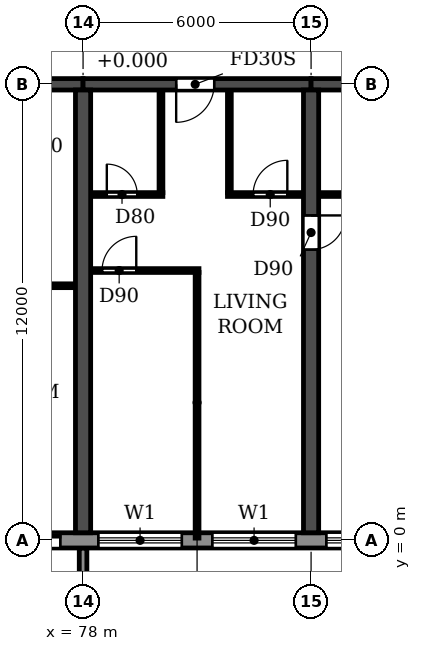
"""IFC4 building model, lengths in metres.
Left out: names, types, materials, properties, quantities, classifications, styles, units other than length and angle.
Written with IfcOpenShell. Run it as: python <this file> out.ifc"""

import sys

from ifc_helpers import new_model, si_unit, direction, frame, frame_2d, origin, place, context, subcontext, project, spatial, polyline, rectangle, outline, extrude, source, transform, mapped, element, fill, save


model = new_model("IFC4")
c1 = context("Model", 3, precision=1e-05, world=origin(), true_north=direction((0.0, 1.0)))
c2 = subcontext(c1, "Body", "Model", "MODEL_VIEW")
j1 = project(units=[si_unit("LENGTHUNIT", "METRE"), si_unit("PLANEANGLEUNIT", "RADIAN")], contexts=[c1])
p1 = place(None, origin())
s1 = spatial("IfcSite", under=j1, at=p1, CompositionType="ELEMENT")
p2 = place(p1, origin())
s2 = spatial("IfcBuilding", under=s1, at=p2, CompositionType="ELEMENT")
p3 = place(p2, frame((0.0, 0.0, 26.7)))
s3 = spatial("IfcBuildingStorey", under=s2, at=p3, CompositionType="ELEMENT", Elevation=26.7)
p4 = place(p3, frame((78.0, 0.2, 0.0), z_axis=(0.0, 0.0, 1.0), x_axis=(0.0, 1.0, 0.0)))
e1 = element("IfcWall", 1, at=p4, inside=s3, PredefinedType="SHEAR", context=c2, shape_type="SweptSolid", body=[
    extrude(rectangle(XDim=11.65, YDim=0.4, at=frame_2d((5.825, 0.0))), origin(), (0.0, 0.0, 1.0), 3.05),
])
p5 = place(p3, frame((84.0, 0.2, 0.0), z_axis=(0.0, 0.0, 1.0), x_axis=(0.0, 1.0, 0.0)))
e2 = element("IfcWall", 2, at=p5, inside=s3, PredefinedType="SHEAR", context=c2, shape_type="SweptSolid", body=[
    extrude(rectangle(XDim=11.65, YDim=0.4, at=frame_2d((5.825, 0.0))), origin(), (0.0, 0.0, 1.0), 3.05),
])
p6 = place(p5, frame((7.45, 0.0, 0.0)))
e3 = element("IfcOpeningElement", 3, at=p6, cuts=e2, PredefinedType="OPENING", context=c2, shape_type="SweptSolid", body=[
    extrude(rectangle(XDim=0.9, YDim=2.1, at=frame_2d((0.45, 1.05))), frame((0.0, 0.21, 0.0), z_axis=(0.0, -1.0, 0.0), x_axis=(1.0, 0.0, 0.0)), (0.0, 0.0, 1.0), 0.42),
])
p7 = place(p3, frame((72.0, 12.0, 0.0), z_axis=(0.0, 0.0, 1.0), x_axis=(1.0, 0.0, 0.0)))
e4 = element("IfcWall", 4, at=p7, inside=s3, PredefinedType="SHEAR", context=c2, shape_type="SweptSolid", body=[
    extrude(rectangle(XDim=6.0, YDim=0.3, at=frame_2d((3.0, 0.0))), origin(), (0.0, 0.0, 1.0), 2.45),
])
p8 = place(p7, frame((2.55, 0.0, 0.0)))
e5 = element("IfcOpeningElement", 5, at=p8, cuts=e4, PredefinedType="OPENING", context=c2, shape_type="SweptSolid", body=[
    extrude(rectangle(XDim=1.0, YDim=2.1, at=frame_2d((0.5, 1.05))), frame((0.0, 0.16, 0.0), z_axis=(0.0, -1.0, 0.0), x_axis=(1.0, 0.0, 0.0)), (0.0, 0.0, 1.0), 0.32),
])
p9 = place(p3, frame((78.0, 12.0, 0.0), z_axis=(0.0, 0.0, 1.0), x_axis=(1.0, 0.0, 0.0)))
e6 = element("IfcWall", 6, at=p9, inside=s3, PredefinedType="SHEAR", context=c2, shape_type="SweptSolid", body=[
    extrude(rectangle(XDim=6.0, YDim=0.3, at=frame_2d((3.0, 0.0))), origin(), (0.0, 0.0, 1.0), 2.45),
])
p10 = place(p9, frame((2.45, 0.0, 0.0)))
e7 = element("IfcOpeningElement", 7, at=p10, cuts=e6, PredefinedType="OPENING", context=c2, shape_type="SweptSolid", body=[
    extrude(rectangle(XDim=1.0, YDim=2.1, at=frame_2d((0.5, 1.05))), frame((0.0, 0.16, 0.0), z_axis=(0.0, -1.0, 0.0), x_axis=(1.0, 0.0, 0.0)), (0.0, 0.0, 1.0), 0.32),
])
p11 = place(p3, frame((84.0, 12.0, 0.0), z_axis=(0.0, 0.0, 1.0), x_axis=(1.0, 0.0, 0.0)))
e8 = element("IfcWall", 8, at=p11, inside=s3, PredefinedType="SHEAR", context=c2, shape_type="SweptSolid", body=[
    extrude(rectangle(XDim=6.0, YDim=0.3, at=frame_2d((3.0, 0.0))), origin(), (0.0, 0.0, 1.0), 2.45),
])
p12 = place(p3, frame((4.683, 0.0, 0.0), z_axis=(0.0, 0.0, 1.0), x_axis=(1.0, 0.0, 0.0)))
e9 = element("IfcWall", 9, at=p12, inside=s3, PredefinedType="STANDARD", context=c2, shape_type="SweptSolid", body=[
    extrude(rectangle(XDim=92.634, YDim=0.4, at=frame_2d((46.317, 0.0))), origin(), (0.0, 0.0, 1.0), 3.05),
])
p13 = place(p12, frame((1.717, 0.0, 0.9)))
e10 = element("IfcOpeningElement", 10, at=p13, cuts=e9, PredefinedType="OPENING", context=c2, shape_type="SweptSolid", body=[
    extrude(rectangle(XDim=2.2, YDim=1.5, at=frame_2d((1.1, 0.75))), frame((0.0, 0.21, 0.0), z_axis=(0.0, -1.0, 0.0), x_axis=(1.0, 0.0, 0.0)), (0.0, 0.0, 1.0), 0.42),
])
p14 = place(p12, frame((4.717, 0.0, 0.9)))
e11 = element("IfcOpeningElement", 11, at=p14, cuts=e9, PredefinedType="OPENING", context=c2, shape_type="SweptSolid", body=[
    extrude(rectangle(XDim=2.2, YDim=1.5, at=frame_2d((1.1, 0.75))), frame((0.0, 0.21, 0.0), z_axis=(0.0, -1.0, 0.0), x_axis=(1.0, 0.0, 0.0)), (0.0, 0.0, 1.0), 0.42),
])
p15 = place(p12, frame((7.717, 0.0, 0.9)))
e12 = element("IfcOpeningElement", 12, at=p15, cuts=e9, PredefinedType="OPENING", context=c2, shape_type="SweptSolid", body=[
    extrude(rectangle(XDim=2.2, YDim=1.5, at=frame_2d((1.1, 0.75))), frame((0.0, 0.21, 0.0), z_axis=(0.0, -1.0, 0.0), x_axis=(1.0, 0.0, 0.0)), (0.0, 0.0, 1.0), 0.42),
])
p16 = place(p12, frame((10.717, 0.0, 0.9)))
e13 = element("IfcOpeningElement", 13, at=p16, cuts=e9, PredefinedType="OPENING", context=c2, shape_type="SweptSolid", body=[
    extrude(rectangle(XDim=2.2, YDim=1.5, at=frame_2d((1.1, 0.75))), frame((0.0, 0.21, 0.0), z_axis=(0.0, -1.0, 0.0), x_axis=(1.0, 0.0, 0.0)), (0.0, 0.0, 1.0), 0.42),
])
p17 = place(p12, frame((13.717, 0.0, 0.9)))
e14 = element("IfcOpeningElement", 14, at=p17, cuts=e9, PredefinedType="OPENING", context=c2, shape_type="SweptSolid", body=[
    extrude(rectangle(XDim=2.2, YDim=1.5, at=frame_2d((1.1, 0.75))), frame((0.0, 0.21, 0.0), z_axis=(0.0, -1.0, 0.0), x_axis=(1.0, 0.0, 0.0)), (0.0, 0.0, 1.0), 0.42),
])
p18 = place(p12, frame((16.717, 0.0, 0.9)))
e15 = element("IfcOpeningElement", 15, at=p18, cuts=e9, PredefinedType="OPENING", context=c2, shape_type="SweptSolid", body=[
    extrude(rectangle(XDim=2.2, YDim=1.5, at=frame_2d((1.1, 0.75))), frame((0.0, 0.21, 0.0), z_axis=(0.0, -1.0, 0.0), x_axis=(1.0, 0.0, 0.0)), (0.0, 0.0, 1.0), 0.42),
])
p19 = place(p12, frame((19.917, 0.0, 0.0)))
e16 = element("IfcOpeningElement", 16, at=p19, cuts=e9, PredefinedType="OPENING", context=c2, shape_type="SweptSolid", body=[
    extrude(rectangle(XDim=1.8, YDim=2.4, at=frame_2d((0.9, 1.2))), frame((0.0, 0.21, 0.0), z_axis=(0.0, -1.0, 0.0), x_axis=(1.0, 0.0, 0.0)), (0.0, 0.0, 1.0), 0.42),
])
p20 = place(p12, frame((22.717, 0.0, 0.9)))
e17 = element("IfcOpeningElement", 17, at=p20, cuts=e9, PredefinedType="OPENING", context=c2, shape_type="SweptSolid", body=[
    extrude(rectangle(XDim=2.2, YDim=1.5, at=frame_2d((1.1, 0.75))), frame((0.0, 0.21, 0.0), z_axis=(0.0, -1.0, 0.0), x_axis=(1.0, 0.0, 0.0)), (0.0, 0.0, 1.0), 0.42),
])
p21 = place(p12, frame((25.717, 0.0, 0.9)))
e18 = element("IfcOpeningElement", 18, at=p21, cuts=e9, PredefinedType="OPENING", context=c2, shape_type="SweptSolid", body=[
    extrude(rectangle(XDim=2.2, YDim=1.5, at=frame_2d((1.1, 0.75))), frame((0.0, 0.21, 0.0), z_axis=(0.0, -1.0, 0.0), x_axis=(1.0, 0.0, 0.0)), (0.0, 0.0, 1.0), 0.42),
])
p22 = place(p12, frame((28.717, 0.0, 0.9)))
e19 = element("IfcOpeningElement", 19, at=p22, cuts=e9, PredefinedType="OPENING", context=c2, shape_type="SweptSolid", body=[
    extrude(rectangle(XDim=2.2, YDim=1.5, at=frame_2d((1.1, 0.75))), frame((0.0, 0.21, 0.0), z_axis=(0.0, -1.0, 0.0), x_axis=(1.0, 0.0, 0.0)), (0.0, 0.0, 1.0), 0.42),
])
p23 = place(p12, frame((31.917, 0.0, 0.0)))
e20 = element("IfcOpeningElement", 20, at=p23, cuts=e9, PredefinedType="OPENING", context=c2, shape_type="SweptSolid", body=[
    extrude(rectangle(XDim=1.8, YDim=2.4, at=frame_2d((0.9, 1.2))), frame((0.0, 0.21, 0.0), z_axis=(0.0, -1.0, 0.0), x_axis=(1.0, 0.0, 0.0)), (0.0, 0.0, 1.0), 0.42),
])
p24 = place(p12, frame((34.717, 0.0, 0.9)))
e21 = element("IfcOpeningElement", 21, at=p24, cuts=e9, PredefinedType="OPENING", context=c2, shape_type="SweptSolid", body=[
    extrude(rectangle(XDim=2.2, YDim=1.5, at=frame_2d((1.1, 0.75))), frame((0.0, 0.21, 0.0), z_axis=(0.0, -1.0, 0.0), x_axis=(1.0, 0.0, 0.0)), (0.0, 0.0, 1.0), 0.42),
])
p25 = place(p12, frame((37.717, 0.0, 0.9)))
e22 = element("IfcOpeningElement", 22, at=p25, cuts=e9, PredefinedType="OPENING", context=c2, shape_type="SweptSolid", body=[
    extrude(rectangle(XDim=2.2, YDim=1.5, at=frame_2d((1.1, 0.75))), frame((0.0, 0.21, 0.0), z_axis=(0.0, -1.0, 0.0), x_axis=(1.0, 0.0, 0.0)), (0.0, 0.0, 1.0), 0.42),
])
p26 = place(p12, frame((40.717, 0.0, 0.9)))
e23 = element("IfcOpeningElement", 23, at=p26, cuts=e9, PredefinedType="OPENING", context=c2, shape_type="SweptSolid", body=[
    extrude(rectangle(XDim=2.2, YDim=1.5, at=frame_2d((1.1, 0.75))), frame((0.0, 0.21, 0.0), z_axis=(0.0, -1.0, 0.0), x_axis=(1.0, 0.0, 0.0)), (0.0, 0.0, 1.0), 0.42),
])
p27 = place(p12, frame((43.917, 0.0, 0.0)))
e24 = element("IfcOpeningElement", 24, at=p27, cuts=e9, PredefinedType="OPENING", context=c2, shape_type="SweptSolid", body=[
    extrude(rectangle(XDim=1.8, YDim=2.4, at=frame_2d((0.9, 1.2))), frame((0.0, 0.21, 0.0), z_axis=(0.0, -1.0, 0.0), x_axis=(1.0, 0.0, 0.0)), (0.0, 0.0, 1.0), 0.42),
])
p28 = place(p12, frame((46.717, 0.0, 0.9)))
e25 = element("IfcOpeningElement", 25, at=p28, cuts=e9, PredefinedType="OPENING", context=c2, shape_type="SweptSolid", body=[
    extrude(rectangle(XDim=2.2, YDim=1.5, at=frame_2d((1.1, 0.75))), frame((0.0, 0.21, 0.0), z_axis=(0.0, -1.0, 0.0), x_axis=(1.0, 0.0, 0.0)), (0.0, 0.0, 1.0), 0.42),
])
p29 = place(p12, frame((49.717, 0.0, 0.9)))
e26 = element("IfcOpeningElement", 26, at=p29, cuts=e9, PredefinedType="OPENING", context=c2, shape_type="SweptSolid", body=[
    extrude(rectangle(XDim=2.2, YDim=1.5, at=frame_2d((1.1, 0.75))), frame((0.0, 0.21, 0.0), z_axis=(0.0, -1.0, 0.0), x_axis=(1.0, 0.0, 0.0)), (0.0, 0.0, 1.0), 0.42),
])
p30 = place(p12, frame((52.717, 0.0, 0.9)))
e27 = element("IfcOpeningElement", 27, at=p30, cuts=e9, PredefinedType="OPENING", context=c2, shape_type="SweptSolid", body=[
    extrude(rectangle(XDim=2.2, YDim=1.5, at=frame_2d((1.1, 0.75))), frame((0.0, 0.21, 0.0), z_axis=(0.0, -1.0, 0.0), x_axis=(1.0, 0.0, 0.0)), (0.0, 0.0, 1.0), 0.42),
])
p31 = place(p12, frame((55.717, 0.0, 0.9)))
e28 = element("IfcOpeningElement", 28, at=p31, cuts=e9, PredefinedType="OPENING", context=c2, shape_type="SweptSolid", body=[
    extrude(rectangle(XDim=2.2, YDim=1.5, at=frame_2d((1.1, 0.75))), frame((0.0, 0.21, 0.0), z_axis=(0.0, -1.0, 0.0), x_axis=(1.0, 0.0, 0.0)), (0.0, 0.0, 1.0), 0.42),
])
p32 = place(p12, frame((58.917, 0.0, 0.0)))
e29 = element("IfcOpeningElement", 29, at=p32, cuts=e9, PredefinedType="OPENING", context=c2, shape_type="SweptSolid", body=[
    extrude(rectangle(XDim=1.8, YDim=2.4, at=frame_2d((0.9, 1.2))), frame((0.0, 0.21, 0.0), z_axis=(0.0, -1.0, 0.0), x_axis=(1.0, 0.0, 0.0)), (0.0, 0.0, 1.0), 0.42),
])
p33 = place(p12, frame((61.717, 0.0, 0.9)))
e30 = element("IfcOpeningElement", 30, at=p33, cuts=e9, PredefinedType="OPENING", context=c2, shape_type="SweptSolid", body=[
    extrude(rectangle(XDim=2.2, YDim=1.5, at=frame_2d((1.1, 0.75))), frame((0.0, 0.21, 0.0), z_axis=(0.0, -1.0, 0.0), x_axis=(1.0, 0.0, 0.0)), (0.0, 0.0, 1.0), 0.42),
])
p34 = place(p12, frame((64.717, 0.0, 0.9)))
e31 = element("IfcOpeningElement", 31, at=p34, cuts=e9, PredefinedType="OPENING", context=c2, shape_type="SweptSolid", body=[
    extrude(rectangle(XDim=2.2, YDim=1.5, at=frame_2d((1.1, 0.75))), frame((0.0, 0.21, 0.0), z_axis=(0.0, -1.0, 0.0), x_axis=(1.0, 0.0, 0.0)), (0.0, 0.0, 1.0), 0.42),
])
p35 = place(p12, frame((67.717, 0.0, 0.9)))
e32 = element("IfcOpeningElement", 32, at=p35, cuts=e9, PredefinedType="OPENING", context=c2, shape_type="SweptSolid", body=[
    extrude(rectangle(XDim=2.2, YDim=1.5, at=frame_2d((1.1, 0.75))), frame((0.0, 0.21, 0.0), z_axis=(0.0, -1.0, 0.0), x_axis=(1.0, 0.0, 0.0)), (0.0, 0.0, 1.0), 0.42),
])
p36 = place(p12, frame((70.917, 0.0, 0.0)))
e33 = element("IfcOpeningElement", 33, at=p36, cuts=e9, PredefinedType="OPENING", context=c2, shape_type="SweptSolid", body=[
    extrude(rectangle(XDim=1.8, YDim=2.4, at=frame_2d((0.9, 1.2))), frame((0.0, 0.21, 0.0), z_axis=(0.0, -1.0, 0.0), x_axis=(1.0, 0.0, 0.0)), (0.0, 0.0, 1.0), 0.42),
])
p37 = place(p12, frame((73.717, 0.0, 0.9)))
e34 = element("IfcOpeningElement", 34, at=p37, cuts=e9, PredefinedType="OPENING", context=c2, shape_type="SweptSolid", body=[
    extrude(rectangle(XDim=2.2, YDim=1.5, at=frame_2d((1.1, 0.75))), frame((0.0, 0.21, 0.0), z_axis=(0.0, -1.0, 0.0), x_axis=(1.0, 0.0, 0.0)), (0.0, 0.0, 1.0), 0.42),
])
p38 = place(p12, frame((76.717, 0.0, 0.9)))
e35 = element("IfcOpeningElement", 35, at=p38, cuts=e9, PredefinedType="OPENING", context=c2, shape_type="SweptSolid", body=[
    extrude(rectangle(XDim=2.2, YDim=1.5, at=frame_2d((1.1, 0.75))), frame((0.0, 0.21, 0.0), z_axis=(0.0, -1.0, 0.0), x_axis=(1.0, 0.0, 0.0)), (0.0, 0.0, 1.0), 0.42),
])
p39 = place(p12, frame((79.717, 0.0, 0.9)))
e36 = element("IfcOpeningElement", 36, at=p39, cuts=e9, PredefinedType="OPENING", context=c2, shape_type="SweptSolid", body=[
    extrude(rectangle(XDim=2.2, YDim=1.5, at=frame_2d((1.1, 0.75))), frame((0.0, 0.21, 0.0), z_axis=(0.0, -1.0, 0.0), x_axis=(1.0, 0.0, 0.0)), (0.0, 0.0, 1.0), 0.42),
])
p40 = place(p12, frame((82.717, 0.0, 0.9)))
e37 = element("IfcOpeningElement", 37, at=p40, cuts=e9, PredefinedType="OPENING", context=c2, shape_type="SweptSolid", body=[
    extrude(rectangle(XDim=2.2, YDim=1.5, at=frame_2d((1.1, 0.75))), frame((0.0, 0.21, 0.0), z_axis=(0.0, -1.0, 0.0), x_axis=(1.0, 0.0, 0.0)), (0.0, 0.0, 1.0), 0.42),
])
p41 = place(p12, frame((85.717, 0.0, 0.9)))
e38 = element("IfcOpeningElement", 38, at=p41, cuts=e9, PredefinedType="OPENING", context=c2, shape_type="SweptSolid", body=[
    extrude(rectangle(XDim=2.2, YDim=1.5, at=frame_2d((1.1, 0.75))), frame((0.0, 0.21, 0.0), z_axis=(0.0, -1.0, 0.0), x_axis=(1.0, 0.0, 0.0)), (0.0, 0.0, 1.0), 0.42),
])
p42 = place(p12, frame((88.717, 0.0, 0.9)))
e39 = element("IfcOpeningElement", 39, at=p42, cuts=e9, PredefinedType="OPENING", context=c2, shape_type="SweptSolid", body=[
    extrude(rectangle(XDim=2.2, YDim=1.5, at=frame_2d((1.1, 0.75))), frame((0.0, 0.21, 0.0), z_axis=(0.0, -1.0, 0.0), x_axis=(1.0, 0.0, 0.0)), (0.0, 0.0, 1.0), 0.42),
])
m1 = source(origin(), c2, "Body", "SweptSolid", [
    extrude(outline(polyline([(0.0, 0.0), (0.2, 0.0), (0.2, 1.65), (0.0, 1.65), (0.0, 0.0)])), origin(), (0.0, 0.0, 1.0), 3.1),
])
p43 = place(p3, frame((77.9, -1.85, 0.0)))
e40 = element("IfcWall", 40, at=p43, inside=s3, PredefinedType="STANDARD", context=c2, shape_type="MappedRepresentation", body=[
    mapped(m1, transform((0.0, 0.0, 0.0))),
])
p44 = place(p3, frame((75.9, 6.7, 0.0), z_axis=(0.0, 0.0, 1.0), x_axis=(1.0, 0.0, 0.0)))
e41 = element("IfcWall", 41, at=p44, inside=s3, PredefinedType="PARTITIONING", context=c2, shape_type="SweptSolid", body=[
    extrude(rectangle(XDim=1.89, YDim=0.1, at=frame_2d((0.945, 0.0))), origin(), (0.0, 0.0, 1.0), 3.05),
])
p45 = place(p3, frame((78.21, 7.1, 0.0), z_axis=(0.0, 0.0, 1.0), x_axis=(1.0, 0.0, 0.0)))
e42 = element("IfcWall", 42, at=p45, inside=s3, PredefinedType="PARTITIONING", context=c2, shape_type="SweptSolid", body=[
    extrude(rectangle(XDim=2.84, YDim=0.1, at=frame_2d((1.42, 0.0))), origin(), (0.0, 0.0, 1.0), 3.05),
])
p46 = place(p45, frame((0.29, 0.0, 0.0)))
e43 = element("IfcOpeningElement", 43, at=p46, cuts=e42, PredefinedType="OPENING", context=c2, shape_type="SweptSolid", body=[
    extrude(rectangle(XDim=0.9, YDim=2.1, at=frame_2d((0.45, 1.05))), frame((0.0, 0.06, 0.0), z_axis=(0.0, -1.0, 0.0), x_axis=(1.0, 0.0, 0.0)), (0.0, 0.0, 1.0), 0.12),
])
p47 = place(p3, frame((78.21, 9.1, 0.0), z_axis=(0.0, 0.0, 1.0), x_axis=(1.0, 0.0, 0.0)))
e44 = element("IfcWall", 44, at=p47, inside=s3, PredefinedType="PARTITIONING", context=c2, shape_type="SweptSolid", body=[
    extrude(rectangle(XDim=1.89, YDim=0.1, at=frame_2d((0.945, 0.0))), origin(), (0.0, 0.0, 1.0), 3.05),
])
p48 = place(p47, frame((0.415, 0.0, 0.0)))
e45 = element("IfcOpeningElement", 45, at=p48, cuts=e44, PredefinedType="OPENING", context=c2, shape_type="SweptSolid", body=[
    extrude(rectangle(XDim=0.8, YDim=2.1, at=frame_2d((0.4, 1.05))), frame((0.0, 0.06, 0.0), z_axis=(0.0, -1.0, 0.0), x_axis=(1.0, 0.0, 0.0)), (0.0, 0.0, 1.0), 0.12),
])
p49 = place(p3, frame((81.8, 9.1, 0.0), z_axis=(0.0, 0.0, 1.0), x_axis=(1.0, 0.0, 0.0)))
e46 = element("IfcWall", 46, at=p49, inside=s3, PredefinedType="PARTITIONING", context=c2, shape_type="SweptSolid", body=[
    extrude(rectangle(XDim=1.99, YDim=0.1, at=frame_2d((0.995, 0.0))), origin(), (0.0, 0.0, 1.0), 3.05),
])
p50 = place(p49, frame((0.675, 0.0, 0.0)))
e47 = element("IfcOpeningElement", 47, at=p50, cuts=e46, PredefinedType="OPENING", context=c2, shape_type="SweptSolid", body=[
    extrude(rectangle(XDim=0.9, YDim=2.1, at=frame_2d((0.45, 1.05))), frame((0.0, 0.06, 0.0), z_axis=(0.0, -1.0, 0.0), x_axis=(1.0, 0.0, 0.0)), (0.0, 0.0, 1.0), 0.12),
])
p51 = place(p3, frame((84.21, 9.1, 0.0), z_axis=(0.0, 0.0, 1.0), x_axis=(1.0, 0.0, 0.0)))
e48 = element("IfcWall", 48, at=p51, inside=s3, PredefinedType="PARTITIONING", context=c2, shape_type="SweptSolid", body=[
    extrude(rectangle(XDim=2.69, YDim=0.1, at=frame_2d((1.345, 0.0))), origin(), (0.0, 0.0, 1.0), 3.05),
])
p52 = place(p51, frame((0.89, 0.0, 0.0)))
e49 = element("IfcOpeningElement", 49, at=p52, cuts=e48, PredefinedType="OPENING", context=c2, shape_type="SweptSolid", body=[
    extrude(rectangle(XDim=0.8, YDim=2.1, at=frame_2d((0.4, 1.05))), frame((0.0, 0.06, 0.0), z_axis=(0.0, -1.0, 0.0), x_axis=(1.0, 0.0, 0.0)), (0.0, 0.0, 1.0), 0.12),
])
p53 = place(p3, frame((80.05, 9.15, 0.0), z_axis=(0.0, 0.0, 1.0), x_axis=(0.0, 1.0, 0.0)))
e50 = element("IfcWall", 50, at=p53, inside=s3, PredefinedType="PARTITIONING", context=c2, shape_type="SweptSolid", body=[
    extrude(rectangle(XDim=2.69, YDim=0.1, at=frame_2d((1.345, 0.0))), origin(), (0.0, 0.0, 1.0), 3.05),
])
p54 = place(p3, frame((81.0, 0.06, 0.0), z_axis=(0.0, 0.0, 1.0), x_axis=(0.0, 1.0, 0.0)))
e51 = element("IfcWall", 51, at=p54, inside=s3, PredefinedType="PARTITIONING", context=c2, shape_type="SweptSolid", body=[
    extrude(rectangle(XDim=6.99, YDim=0.1, at=frame_2d((3.495, 0.0))), origin(), (0.0, 0.0, 1.0), 3.05),
])
p55 = place(p3, frame((81.85, 9.15, 0.0), z_axis=(0.0, 0.0, 1.0), x_axis=(0.0, 1.0, 0.0)))
e52 = element("IfcWall", 52, at=p55, inside=s3, PredefinedType="PARTITIONING", context=c2, shape_type="SweptSolid", body=[
    extrude(rectangle(XDim=2.69, YDim=0.1, at=frame_2d((1.345, 0.0))), origin(), (0.0, 0.0, 1.0), 3.05),
])
p56 = place(p36, origin())
e53 = element("IfcDoor", 53, at=p56, inside=s3, OperationType="DOUBLE_DOOR_SLIDING", PredefinedType="DOOR", context=c2, shape_type="SweptSolid", body=[
    extrude(rectangle(XDim=1.8, YDim=2.4, at=frame_2d((0.9, 1.2))), frame((0.0, 0.025, 0.0), z_axis=(0.0, -1.0, 0.0), x_axis=(1.0, 0.0, 0.0)), (0.0, 0.0, 1.0), 0.05),
])
fill(e33, e53)
p57 = place(p37, origin())
e54 = element("IfcWindow", 54, at=p57, inside=s3, PartitioningType="DOUBLE_PANEL_HORIZONTAL", PredefinedType="WINDOW", context=c2, shape_type="SweptSolid", body=[
    extrude(rectangle(XDim=2.2, YDim=1.5, at=frame_2d((1.1, 0.75))), frame((0.0, 0.03, 0.0), z_axis=(0.0, -1.0, 0.0), x_axis=(1.0, 0.0, 0.0)), (0.0, 0.0, 1.0), 0.06),
])
fill(e34, e54)
p58 = place(p38, origin())
e55 = element("IfcWindow", 55, at=p58, inside=s3, PartitioningType="DOUBLE_PANEL_HORIZONTAL", PredefinedType="WINDOW", context=c2, shape_type="SweptSolid", body=[
    extrude(rectangle(XDim=2.2, YDim=1.5, at=frame_2d((1.1, 0.75))), frame((0.0, 0.03, 0.0), z_axis=(0.0, -1.0, 0.0), x_axis=(1.0, 0.0, 0.0)), (0.0, 0.0, 1.0), 0.06),
])
fill(e35, e55)
p59 = place(p39, origin())
e56 = element("IfcWindow", 56, at=p59, inside=s3, PartitioningType="DOUBLE_PANEL_HORIZONTAL", PredefinedType="WINDOW", context=c2, shape_type="SweptSolid", body=[
    extrude(rectangle(XDim=2.2, YDim=1.5, at=frame_2d((1.1, 0.75))), frame((0.0, 0.03, 0.0), z_axis=(0.0, -1.0, 0.0), x_axis=(1.0, 0.0, 0.0)), (0.0, 0.0, 1.0), 0.06),
])
fill(e36, e56)
p60 = place(p46, origin())
e57 = element("IfcDoor", 57, at=p60, inside=s3, OperationType="SINGLE_SWING_RIGHT", PredefinedType="DOOR", context=c2, shape_type="SweptSolid", body=[
    extrude(rectangle(XDim=0.9, YDim=2.1, at=frame_2d((0.45, 1.05))), frame((0.0, 0.025, 0.0), z_axis=(0.0, -1.0, 0.0), x_axis=(1.0, 0.0, 0.0)), (0.0, 0.0, 1.0), 0.05),
])
fill(e43, e57)
p61 = place(p48, origin())
e58 = element("IfcDoor", 58, at=p61, inside=s3, OperationType="SINGLE_SWING_LEFT", PredefinedType="DOOR", context=c2, shape_type="SweptSolid", body=[
    extrude(rectangle(XDim=0.8, YDim=2.1, at=frame_2d((0.4, 1.05))), frame((0.0, 0.025, 0.0), z_axis=(0.0, -1.0, 0.0), x_axis=(1.0, 0.0, 0.0)), (0.0, 0.0, 1.0), 0.05),
])
fill(e45, e58)
p62 = place(p10, frame((1.0, 0.0, 0.0), z_axis=(0.0, 0.0, 1.0), x_axis=(-1.0, 0.0, 0.0)))
e59 = element("IfcDoor", 59, at=p62, inside=s3, OperationType="SINGLE_SWING_RIGHT", PredefinedType="DOOR", context=c2, shape_type="SweptSolid", body=[
    extrude(rectangle(XDim=1.0, YDim=2.1, at=frame_2d((0.5, 1.05))), frame((0.0, 0.025, 0.0), z_axis=(0.0, -1.0, 0.0), x_axis=(1.0, 0.0, 0.0)), (0.0, 0.0, 1.0), 0.05),
])
fill(e7, e59)
p63 = place(p50, origin())
e60 = element("IfcDoor", 60, at=p63, inside=s3, OperationType="SINGLE_SWING_RIGHT", PredefinedType="DOOR", context=c2, shape_type="SweptSolid", body=[
    extrude(rectangle(XDim=0.9, YDim=2.1, at=frame_2d((0.45, 1.05))), frame((0.0, 0.025, 0.0), z_axis=(0.0, -1.0, 0.0), x_axis=(1.0, 0.0, 0.0)), (0.0, 0.0, 1.0), 0.05),
])
fill(e47, e60)
p64 = place(p6, frame((0.9, 0.0, 0.0), z_axis=(0.0, 0.0, 1.0), x_axis=(-1.0, 0.0, 0.0)))
e61 = element("IfcDoor", 61, at=p64, inside=s3, OperationType="SINGLE_SWING_LEFT", PredefinedType="DOOR", context=c2, shape_type="SweptSolid", body=[
    extrude(rectangle(XDim=0.9, YDim=2.1, at=frame_2d((0.45, 1.05))), frame((0.0, 0.025, 0.0), z_axis=(0.0, -1.0, 0.0), x_axis=(1.0, 0.0, 0.0)), (0.0, 0.0, 1.0), 0.05),
])
fill(e3, e61)
save(model, sys.argv[1])
